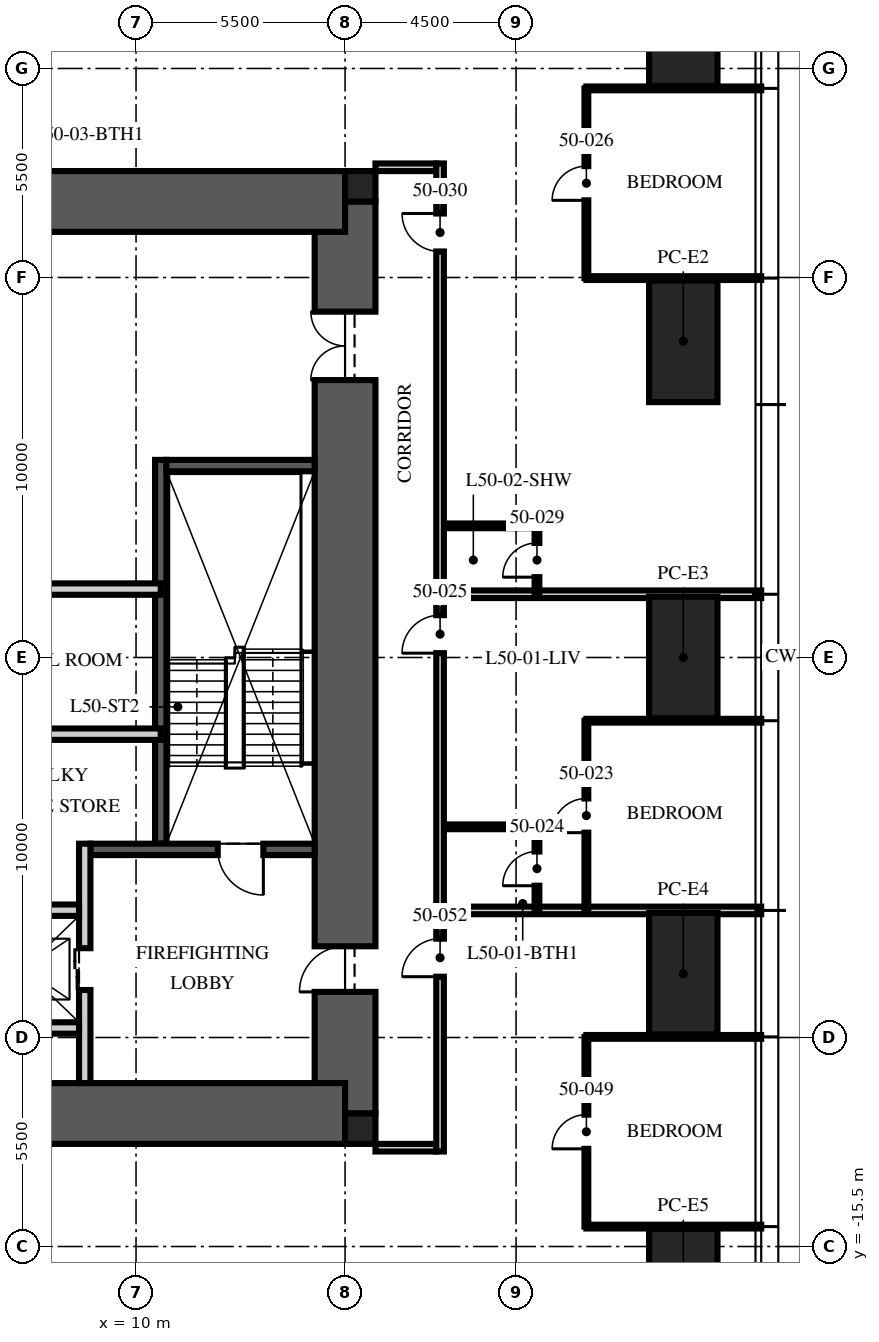
"""IFC4 building model, lengths in metres.
Left out: names, types, materials, properties, quantities, classifications, styles, units other than length and angle.
Written with IfcOpenShell. Run it as: python <this file> out.ifc"""

import sys

from ifc_helpers import new_model, si_unit, direction, frame, frame_2d, origin, origin_2d, place, context, subcontext, project, spatial, rectangle, hollow_rectangle, extrude, element, fill, save


model = new_model("IFC4")
c1 = context("Model", 3, precision=1e-05, world=origin(), true_north=direction((0.0, 1.0)))
c2 = subcontext(c1, "Body", "Model", "MODEL_VIEW")
j1 = project(units=[si_unit("LENGTHUNIT", "METRE"), si_unit("PLANEANGLEUNIT", "RADIAN")], contexts=[c1])
p1 = place(None, origin())
s1 = spatial("IfcSite", under=j1, at=p1, CompositionType="ELEMENT")
p2 = place(p1, origin())
s2 = spatial("IfcBuilding", under=s1, at=p2, CompositionType="ELEMENT")
p3 = place(p2, frame((0.0, 0.0, 203.25)))
s3 = spatial("IfcBuildingStorey", under=s2, at=p3, CompositionType="ELEMENT", Elevation=203.25)
p4 = place(p3, frame((15.5, -12.0, -0.25), z_axis=(0.0, 0.0, 1.0), x_axis=(0.0, 1.0, 0.0)))
e1 = element("IfcWall", 1, at=p4, inside=s3, PredefinedType="SHEAR", context=c2, shape_type="SweptSolid", body=[
    extrude(rectangle(XDim=24.0, YDim=1.6, at=frame_2d((12.0, 0.0))), origin(), (0.0, 0.0, 1.0), 3.75),
])
p5 = place(p4, frame((3.2, 0.0, 0.25)))
e2 = element("IfcOpeningElement", 2, at=p5, cuts=e1, PredefinedType="OPENING", context=c2, shape_type="SweptSolid", body=[
    extrude(rectangle(XDim=1.2, YDim=2.1, at=frame_2d((0.6, 1.05))), frame((0.0, 0.81, 0.0), z_axis=(0.0, -1.0, 0.0), x_axis=(1.0, 0.0, 0.0)), (0.0, 0.0, 1.0), 1.62),
])
p6 = place(p4, frame((19.3, 0.0, 0.25)))
e3 = element("IfcOpeningElement", 3, at=p6, cuts=e1, PredefinedType="OPENING", context=c2, shape_type="SweptSolid", body=[
    extrude(rectangle(XDim=1.8, YDim=2.1, at=frame_2d((0.9, 1.05))), frame((0.0, 0.81, 0.0), z_axis=(0.0, -1.0, 0.0), x_axis=(1.0, 0.0, 0.0)), (0.0, 0.0, 1.0), 1.62),
])
for number, where, z_axis, x_axis in (
    (4, (-15.5, 12.0, -0.25), (0.0, 0.0, 1.0), (1.0, 0.0, 0.0)),
    (5, (-15.5, -12.0, -0.25), (0.0, 0.0, 1.0), (1.0, 0.0, 0.0)),
):
    element("IfcWall", number, at=place(p3, frame(where, z_axis=z_axis, x_axis=x_axis)), inside=s3, PredefinedType="SHEAR", context=c2, shape_type="SweptSolid", body=[
        extrude(rectangle(XDim=31.0, YDim=1.6, at=frame_2d((15.5, 0.0))), origin(), (0.0, 0.0, 1.0), 3.75),
    ])
for number, where, z_axis, x_axis in (
    (6, (15.9, 12.4, -0.25), (0.0, 0.0, 1.0), (1.0, 0.0, 0.0)),
    (7, (15.9, -12.4, -0.25), (0.0, 0.0, 1.0), (1.0, 0.0, 0.0)),
):
    element("IfcColumn", number, at=place(p3, frame(where, z_axis=z_axis, x_axis=x_axis)), inside=s3, PredefinedType="COLUMN", context=c2, shape_type="SweptSolid", body=[
        extrude(rectangle(XDim=0.8, YDim=0.8, at=origin_2d()), origin(), (0.0, 0.0, 1.0), 3.75),
    ])
for number, where, z_axis, x_axis in (
    (8, (24.4, 16.64, 0.0), (0.0, 0.0, 1.0), (0.0, 1.0, 0.0)),
    (9, (24.4, 8.32, 0.0), (0.0, 0.0, 1.0), (0.0, 1.0, 0.0)),
    (10, (24.4, 0.0, 0.0), (0.0, 0.0, 1.0), (0.0, 1.0, 0.0)),
    (11, (24.4, -8.32, 0.0), (0.0, 0.0, 1.0), (0.0, 1.0, 0.0)),
    (12, (24.4, -16.64, 0.0), (0.0, 0.0, 1.0), (0.0, 1.0, 0.0)),
):
    element("IfcColumn", number, at=place(p3, frame(where, z_axis=z_axis, x_axis=x_axis)), inside=s3, PredefinedType="COLUMN", context=c2, shape_type="SweptSolid", body=[
        extrude(hollow_rectangle(XDim=3.2, YDim=1.8, WallThickness=0.2, at=origin_2d()), origin(), (0.0, 0.0, 1.0), 3.75),
    ])
p7 = place(p3, frame((10.65, -4.9, 0.0), z_axis=(0.0, 0.0, 1.0), x_axis=(0.0, 1.0, 0.0)))
e13 = element("IfcWall", 13, at=p7, inside=s3, PredefinedType="SOLIDWALL", context=c2, shape_type="SweptSolid", body=[
    extrude(rectangle(XDim=10.1, YDim=0.3, at=frame_2d((5.05, 0.0))), origin(), (0.0, 0.0, 1.0), 3.5),
])
p8 = place(p3, frame((14.7, -5.05, 0.0), z_axis=(0.0, 0.0, 1.0), x_axis=(-1.0, 0.0, 0.0)))
e14 = element("IfcWall", 14, at=p8, inside=s3, PredefinedType="SOLIDWALL", context=c2, shape_type="SweptSolid", body=[
    extrude(rectangle(XDim=5.9, YDim=0.3, at=frame_2d((2.95, 0.0))), origin(), (0.0, 0.0, 1.0), 3.5),
])
p9 = place(p8, frame((1.35, 0.0, 0.0)))
e15 = element("IfcOpeningElement", 15, at=p9, cuts=e14, PredefinedType="OPENING", context=c2, shape_type="SweptSolid", body=[
    extrude(rectangle(XDim=1.2, YDim=2.1, at=frame_2d((0.6, 1.05))), frame((0.0, 0.16, 0.0), z_axis=(0.0, -1.0, 0.0), x_axis=(1.0, 0.0, 0.0)), (0.0, 0.0, 1.0), 0.32),
])
p10 = place(p3, frame((14.7, 5.05, 0.0), z_axis=(0.0, 0.0, 1.0), x_axis=(-1.0, 0.0, 0.0)))
e16 = element("IfcWall", 16, at=p10, inside=s3, PredefinedType="SOLIDWALL", context=c2, shape_type="SweptSolid", body=[
    extrude(rectangle(XDim=3.9, YDim=0.3, at=frame_2d((1.95, 0.0))), origin(), (0.0, 0.0, 1.0), 3.5),
])
p11 = place(p3, frame((8.65, -11.2, 0.0), z_axis=(0.0, 0.0, 1.0), x_axis=(0.0, 1.0, 0.0)))
e17 = element("IfcWall", 17, at=p11, inside=s3, PredefinedType="PARTITIONING", context=c2, shape_type="SweptSolid", body=[
    extrude(rectangle(XDim=6.3, YDim=0.3, at=frame_2d((3.15, 0.0))), origin(), (0.0, 0.0, 1.0), 3.5),
])
p12 = place(p11, frame((2.45, 0.0, 0.0)))
e18 = element("IfcOpeningElement", 18, at=p12, cuts=e17, PredefinedType="OPENING", context=c2, shape_type="SweptSolid", body=[
    extrude(rectangle(XDim=1.1, YDim=2.1, at=frame_2d((0.55, 1.05))), frame((0.0, 0.16, 0.0), z_axis=(0.0, -1.0, 0.0), x_axis=(1.0, 0.0, 0.0)), (0.0, 0.0, 1.0), 0.32),
])
p13 = place(p3, frame((-8.5, -6.65, 0.0), z_axis=(0.0, 0.0, 1.0), x_axis=(1.0, 0.0, 0.0)))
e19 = element("IfcWall", 19, at=p13, inside=s3, PredefinedType="PARTITIONING", context=c2, shape_type="SweptSolid", body=[
    extrude(rectangle(XDim=17.0, YDim=0.3, at=frame_2d((8.5, 0.0))), origin(), (0.0, 0.0, 1.0), 3.5),
])
p14 = place(p13, frame((7.8, 0.0, 0.0)))
e20 = element("IfcOpeningElement", 20, at=p14, cuts=e19, PredefinedType="OPENING", context=c2, shape_type="SweptSolid", body=[
    extrude(rectangle(XDim=1.3, YDim=2.4, at=frame_2d((0.65, 1.2))), frame((0.0, 0.16, 0.0), z_axis=(0.0, -1.0, 0.0), x_axis=(1.0, 0.0, 0.0)), (0.0, 0.0, 1.0), 0.32),
])
p15 = place(p13, frame((5.65, 0.0, 0.0)))
e21 = element("IfcOpeningElement", 21, at=p15, cuts=e19, PredefinedType="OPENING", context=c2, shape_type="SweptSolid", body=[
    extrude(rectangle(XDim=0.9, YDim=2.1, at=frame_2d((0.45, 1.05))), frame((0.0, 0.16, 0.0), z_axis=(0.0, -1.0, 0.0), x_axis=(1.0, 0.0, 0.0)), (0.0, 0.0, 1.0), 0.32),
])
p16 = place(p13, frame((10.4, 0.0, 0.0)))
e22 = element("IfcOpeningElement", 22, at=p16, cuts=e19, PredefinedType="OPENING", context=c2, shape_type="SweptSolid", body=[
    extrude(rectangle(XDim=0.9, YDim=2.1, at=frame_2d((0.45, 1.05))), frame((0.0, 0.16, 0.0), z_axis=(0.0, -1.0, 0.0), x_axis=(1.0, 0.0, 0.0)), (0.0, 0.0, 1.0), 0.32),
])
p17 = place(p3, frame((5.6, -9.75, 0.0), z_axis=(0.0, 0.0, 1.0), x_axis=(1.0, 0.0, 0.0)))
e23 = element("IfcWall", 23, at=p17, inside=s3, PredefinedType="PARTITIONING", context=c2, shape_type="SweptSolid", body=[
    extrude(rectangle(XDim=2.9, YDim=0.3, at=frame_2d((1.45, 0.0))), origin(), (0.0, 0.0, 1.0), 3.5),
])
p18 = place(p3, frame((-10.65, 1.8, 0.0), z_axis=(0.0, 0.0, 1.0), x_axis=(1.0, 0.0, 0.0)))
e24 = element("IfcWall", 24, at=p18, inside=s3, PredefinedType="PARTITIONING", context=c2, shape_type="SweptSolid", body=[
    extrude(rectangle(XDim=21.3, YDim=0.3, at=frame_2d((10.65, 0.0))), origin(), (0.0, 0.0, 1.0), 3.5),
])
p19 = place(p18, frame((10.05, 0.0, 0.0)))
e25 = element("IfcOpeningElement", 25, at=p19, cuts=e24, PredefinedType="OPENING", context=c2, shape_type="SweptSolid", body=[
    extrude(rectangle(XDim=1.2, YDim=2.1, at=frame_2d((0.6, 1.05))), frame((0.0, 0.16, 0.0), z_axis=(0.0, -1.0, 0.0), x_axis=(1.0, 0.0, 0.0)), (0.0, 0.0, 1.0), 0.32),
])
p20 = place(p18, frame((0.938, 0.0, 0.0)))
e26 = element("IfcOpeningElement", 26, at=p20, cuts=e24, PredefinedType="OPENING", context=c2, shape_type="SweptSolid", body=[
    extrude(rectangle(XDim=0.9, YDim=2.1, at=frame_2d((0.45, 1.05))), frame((0.0, 0.16, 0.0), z_axis=(0.0, -1.0, 0.0), x_axis=(1.0, 0.0, 0.0)), (0.0, 0.0, 1.0), 0.32),
])
p21 = place(p3, frame((10.65, -2.018, 0.0), z_axis=(0.0, 0.0, 1.0), x_axis=(-1.0, 0.0, 0.0)))
e27 = element("IfcWall", 27, at=p21, inside=s3, PredefinedType="PARTITIONING", context=c2, shape_type="SweptSolid", body=[
    extrude(rectangle(XDim=5.55, YDim=0.3, at=frame_2d((2.775, 0.0))), origin(), (0.0, 0.0, 1.0), 3.5),
])
for number, where, z_axis, x_axis in (
    (28, (16.3, 12.9, 0.0), (0.0, 0.0, 1.0), (1.0, 0.0, 0.0)),
    (29, (16.3, -12.9, 0.0), (0.0, 0.0, 1.0), (1.0, 0.0, 0.0)),
):
    element("IfcWall", number, at=place(p3, frame(where, z_axis=z_axis, x_axis=x_axis)), inside=s3, PredefinedType="PARTITIONING", context=c2, shape_type="SweptSolid", body=[
        extrude(rectangle(XDim=1.6, YDim=0.2, at=frame_2d((0.8, 0.0))), origin(), (0.0, 0.0, 1.0), 2.3),
    ])
p22 = place(p3, frame((18.1, -6.656, 0.0), z_axis=(0.0, 0.0, 1.0), x_axis=(1.0, 0.0, 0.0)))
e30 = element("IfcWall", 30, at=p22, inside=s3, PredefinedType="PARTITIONING", context=c2, shape_type="SweptSolid", body=[
    extrude(rectangle(XDim=8.35, YDim=0.2, at=frame_2d((4.175, 0.0))), origin(), (0.0, 0.0, 1.0), 2.91),
])
p23 = place(p3, frame((21.85, -1.664, 0.0), z_axis=(0.0, 0.0, 1.0), x_axis=(1.0, 0.0, 0.0)))
e31 = element("IfcWall", 31, at=p23, inside=s3, PredefinedType="PARTITIONING", context=c2, shape_type="SweptSolid", body=[
    extrude(rectangle(XDim=4.6, YDim=0.1, at=frame_2d((2.3, 0.0))), origin(), (0.0, 0.0, 1.0), 2.91),
])
p24 = place(p3, frame((18.1, 1.664, 0.0), z_axis=(0.0, 0.0, 1.0), x_axis=(1.0, 0.0, 0.0)))
e32 = element("IfcWall", 32, at=p24, inside=s3, PredefinedType="PARTITIONING", context=c2, shape_type="SweptSolid", body=[
    extrude(rectangle(XDim=8.35, YDim=0.2, at=frame_2d((4.175, 0.0))), origin(), (0.0, 0.0, 1.0), 2.91),
])
for number, where, z_axis, x_axis in (
    (33, (21.85, 9.984, 0.0), (0.0, 0.0, 1.0), (1.0, 0.0, 0.0)),
    (34, (21.85, 14.976, 0.0), (0.0, 0.0, 1.0), (1.0, 0.0, 0.0)),
    (35, (21.85, -14.976, 0.0), (0.0, 0.0, 1.0), (1.0, 0.0, 0.0)),
    (36, (21.85, -9.984, 0.0), (0.0, 0.0, 1.0), (1.0, 0.0, 0.0)),
):
    element("IfcWall", number, at=place(p3, frame(where, z_axis=z_axis, x_axis=x_axis)), inside=s3, PredefinedType="PARTITIONING", context=c2, shape_type="SweptSolid", body=[
        extrude(rectangle(XDim=4.6, YDim=0.1, at=frame_2d((2.3, 0.0))), origin(), (0.0, 0.0, 1.0), 2.91),
    ])
p25 = place(p3, frame((21.85, -6.656, 0.0), z_axis=(0.0, 0.0, 1.0), x_axis=(0.0, 1.0, 0.0)))
e37 = element("IfcWall", 37, at=p25, inside=s3, PredefinedType="PARTITIONING", context=c2, shape_type="SweptSolid", body=[
    extrude(rectangle(XDim=4.992, YDim=0.1, at=frame_2d((2.496, 0.0))), origin(), (0.0, 0.0, 1.0), 2.81),
])
p26 = place(p25, frame((2.046, 0.0, 0.0)))
e38 = element("IfcOpeningElement", 38, at=p26, cuts=e37, PredefinedType="OPENING", context=c2, shape_type="SweptSolid", body=[
    extrude(rectangle(XDim=0.9, YDim=2.1, at=frame_2d((0.45, 1.05))), frame((0.0, 0.06, 0.0), z_axis=(0.0, -1.0, 0.0), x_axis=(1.0, 0.0, 0.0)), (0.0, 0.0, 1.0), 0.12),
])
p27 = place(p3, frame((20.55, -6.656, 0.0), z_axis=(0.0, 0.0, 1.0), x_axis=(0.0, 1.0, 0.0)))
e39 = element("IfcWall", 39, at=p27, inside=s3, PredefinedType="PARTITIONING", context=c2, shape_type="SweptSolid", body=[
    extrude(rectangle(XDim=2.2, YDim=0.125, at=frame_2d((1.1, 0.0))), origin(), (0.0, 0.0, 1.0), 3.5),
])
p28 = place(p27, frame((0.65, 0.0, 0.0)))
e40 = element("IfcOpeningElement", 40, at=p28, cuts=e39, PredefinedType="OPENING", context=c2, shape_type="SweptSolid", body=[
    extrude(rectangle(XDim=0.9, YDim=2.1, at=frame_2d((0.45, 1.05))), frame((0.0, 0.073, 0.0), z_axis=(0.0, -1.0, 0.0), x_axis=(1.0, 0.0, 0.0)), (0.0, 0.0, 1.0), 0.145),
])
p29 = place(p3, frame((18.1, -4.456, 0.0), z_axis=(0.0, 0.0, 1.0), x_axis=(1.0, 0.0, 0.0)))
e41 = element("IfcWall", 41, at=p29, inside=s3, PredefinedType="PARTITIONING", context=c2, shape_type="SweptSolid", body=[
    extrude(rectangle(XDim=2.45, YDim=0.125, at=frame_2d((1.225, 0.0))), origin(), (0.0, 0.0, 1.0), 3.5),
])
p30 = place(p3, frame((21.85, 9.984, 0.0), z_axis=(0.0, 0.0, 1.0), x_axis=(0.0, 1.0, 0.0)))
e42 = element("IfcWall", 42, at=p30, inside=s3, PredefinedType="PARTITIONING", context=c2, shape_type="SweptSolid", body=[
    extrude(rectangle(XDim=4.992, YDim=0.1, at=frame_2d((2.496, 0.0))), origin(), (0.0, 0.0, 1.0), 2.81),
])
p31 = place(p30, frame((2.046, 0.0, 0.0)))
e43 = element("IfcOpeningElement", 43, at=p31, cuts=e42, PredefinedType="OPENING", context=c2, shape_type="SweptSolid", body=[
    extrude(rectangle(XDim=0.9, YDim=2.1, at=frame_2d((0.45, 1.05))), frame((0.0, 0.06, 0.0), z_axis=(0.0, -1.0, 0.0), x_axis=(1.0, 0.0, 0.0)), (0.0, 0.0, 1.0), 0.12),
])
p32 = place(p3, frame((20.55, 1.664, 0.0), z_axis=(0.0, 0.0, 1.0), x_axis=(0.0, 1.0, 0.0)))
e44 = element("IfcWall", 44, at=p32, inside=s3, PredefinedType="PARTITIONING", context=c2, shape_type="SweptSolid", body=[
    extrude(rectangle(XDim=1.8, YDim=0.125, at=frame_2d((0.9, 0.0))), origin(), (0.0, 0.0, 1.0), 3.5),
])
p33 = place(p32, frame((0.45, 0.0, 0.0)))
e45 = element("IfcOpeningElement", 45, at=p33, cuts=e44, PredefinedType="OPENING", context=c2, shape_type="SweptSolid", body=[
    extrude(rectangle(XDim=0.9, YDim=2.1, at=frame_2d((0.45, 1.05))), frame((0.0, 0.073, 0.0), z_axis=(0.0, -1.0, 0.0), x_axis=(1.0, 0.0, 0.0)), (0.0, 0.0, 1.0), 0.145),
])
p34 = place(p3, frame((18.1, 3.464, 0.0), z_axis=(0.0, 0.0, 1.0), x_axis=(1.0, 0.0, 0.0)))
e46 = element("IfcWall", 46, at=p34, inside=s3, PredefinedType="PARTITIONING", context=c2, shape_type="SweptSolid", body=[
    extrude(rectangle(XDim=2.45, YDim=0.125, at=frame_2d((1.225, 0.0))), origin(), (0.0, 0.0, 1.0), 3.5),
])
p35 = place(p3, frame((21.85, -14.976, 0.0), z_axis=(0.0, 0.0, 1.0), x_axis=(0.0, 1.0, 0.0)))
e47 = element("IfcWall", 47, at=p35, inside=s3, PredefinedType="PARTITIONING", context=c2, shape_type="SweptSolid", body=[
    extrude(rectangle(XDim=4.992, YDim=0.1, at=frame_2d((2.496, 0.0))), origin(), (0.0, 0.0, 1.0), 2.81),
])
p36 = place(p35, frame((2.046, 0.0, 0.0)))
e48 = element("IfcOpeningElement", 48, at=p36, cuts=e47, PredefinedType="OPENING", context=c2, shape_type="SweptSolid", body=[
    extrude(rectangle(XDim=0.9, YDim=2.1, at=frame_2d((0.45, 1.05))), frame((0.0, 0.06, 0.0), z_axis=(0.0, -1.0, 0.0), x_axis=(1.0, 0.0, 0.0)), (0.0, 0.0, 1.0), 0.12),
])
p37 = place(p3, frame((18.0, -13.0, 0.0), z_axis=(0.0, 0.0, 1.0), x_axis=(0.0, 1.0, 0.0)))
e49 = element("IfcWall", 49, at=p37, inside=s3, PredefinedType="PARTITIONING", context=c2, shape_type="SweptSolid", body=[
    extrude(rectangle(XDim=26.0, YDim=0.2, at=frame_2d((13.0, 0.0))), origin(), (0.0, 0.0, 1.0), 2.6),
])
p38 = place(p37, frame((13.114, 0.0, 0.0)))
e50 = element("IfcOpeningElement", 50, at=p38, cuts=e49, PredefinedType="OPENING", context=c2, shape_type="SweptSolid", body=[
    extrude(rectangle(XDim=1.0, YDim=2.2, at=frame_2d((0.5, 1.1))), frame((0.0, 0.11, 0.0), z_axis=(0.0, -1.0, 0.0), x_axis=(1.0, 0.0, 0.0)), (0.0, 0.0, 1.0), 0.22),
])
p39 = place(p37, frame((23.684, 0.0, 0.0)))
e51 = element("IfcOpeningElement", 51, at=p39, cuts=e49, PredefinedType="OPENING", context=c2, shape_type="SweptSolid", body=[
    extrude(rectangle(XDim=1.0, YDim=2.2, at=frame_2d((0.5, 1.1))), frame((0.0, 0.11, 0.0), z_axis=(0.0, -1.0, 0.0), x_axis=(1.0, 0.0, 0.0)), (0.0, 0.0, 1.0), 0.22),
])
p40 = place(p37, frame((4.6, 0.0, 0.0)))
e52 = element("IfcOpeningElement", 52, at=p40, cuts=e49, PredefinedType="OPENING", context=c2, shape_type="SweptSolid", body=[
    extrude(rectangle(XDim=1.0, YDim=2.2, at=frame_2d((0.5, 1.1))), frame((0.0, 0.11, 0.0), z_axis=(0.0, -1.0, 0.0), x_axis=(1.0, 0.0, 0.0)), (0.0, 0.0, 1.0), 0.22),
])
p41 = place(p9, origin())
e53 = element("IfcDoor", 53, at=p41, inside=s3, OperationType="SINGLE_SWING_LEFT", PredefinedType="DOOR", context=c2, shape_type="SweptSolid", body=[
    extrude(rectangle(XDim=1.2, YDim=2.1, at=frame_2d((0.6, 1.05))), frame((0.0, 0.025, 0.0), z_axis=(0.0, -1.0, 0.0), x_axis=(1.0, 0.0, 0.0)), (0.0, 0.0, 1.0), 0.05),
])
fill(e15, e53)
p42 = place(p5, origin())
e54 = element("IfcDoor", 54, at=p42, inside=s3, OperationType="SINGLE_SWING_LEFT", PredefinedType="DOOR", context=c2, shape_type="SweptSolid", body=[
    extrude(rectangle(XDim=1.2, YDim=2.1, at=frame_2d((0.6, 1.05))), frame((0.0, 0.025, 0.0), z_axis=(0.0, -1.0, 0.0), x_axis=(1.0, 0.0, 0.0)), (0.0, 0.0, 1.0), 0.05),
])
fill(e2, e54)
p43 = place(p6, origin())
e55 = element("IfcDoor", 55, at=p43, inside=s3, OperationType="DOUBLE_DOOR_SINGLE_SWING", PredefinedType="DOOR", context=c2, shape_type="SweptSolid", body=[
    extrude(rectangle(XDim=1.8, YDim=2.1, at=frame_2d((0.9, 1.05))), frame((0.0, 0.025, 0.0), z_axis=(0.0, -1.0, 0.0), x_axis=(1.0, 0.0, 0.0)), (0.0, 0.0, 1.0), 0.05),
])
fill(e3, e55)
p44 = place(p12, origin())
e56 = element("IfcDoor", 56, at=p44, inside=s3, OperationType="DOUBLE_DOOR_SLIDING", PredefinedType="DOOR", context=c2, shape_type="SweptSolid", body=[
    extrude(rectangle(XDim=1.1, YDim=2.1, at=frame_2d((0.55, 1.05))), frame((0.0, 0.025, 0.0), z_axis=(0.0, -1.0, 0.0), x_axis=(1.0, 0.0, 0.0)), (0.0, 0.0, 1.0), 0.05),
])
fill(e18, e56)
p45 = place(p26, origin())
e57 = element("IfcDoor", 57, at=p45, inside=s3, OperationType="SINGLE_SWING_LEFT", PredefinedType="DOOR", context=c2, shape_type="SweptSolid", body=[
    extrude(rectangle(XDim=0.9, YDim=2.1, at=frame_2d((0.45, 1.05))), frame((0.0, 0.025, 0.0), z_axis=(0.0, -1.0, 0.0), x_axis=(1.0, 0.0, 0.0)), (0.0, 0.0, 1.0), 0.05),
])
fill(e38, e57)
p46 = place(p28, origin())
e58 = element("IfcDoor", 58, at=p46, inside=s3, OperationType="SINGLE_SWING_LEFT", PredefinedType="DOOR", context=c2, shape_type="SweptSolid", body=[
    extrude(rectangle(XDim=0.9, YDim=2.1, at=frame_2d((0.45, 1.05))), frame((0.0, 0.025, 0.0), z_axis=(0.0, -1.0, 0.0), x_axis=(1.0, 0.0, 0.0)), (0.0, 0.0, 1.0), 0.05),
])
fill(e40, e58)
p47 = place(p38, origin())
e59 = element("IfcDoor", 59, at=p47, inside=s3, OperationType="SINGLE_SWING_LEFT", PredefinedType="DOOR", context=c2, shape_type="SweptSolid", body=[
    extrude(rectangle(XDim=1.0, YDim=2.2, at=frame_2d((0.5, 1.1))), frame((0.0, 0.025, 0.0), z_axis=(0.0, -1.0, 0.0), x_axis=(1.0, 0.0, 0.0)), (0.0, 0.0, 1.0), 0.05),
])
fill(e50, e59)
p48 = place(p31, origin())
e60 = element("IfcDoor", 60, at=p48, inside=s3, OperationType="SINGLE_SWING_LEFT", PredefinedType="DOOR", context=c2, shape_type="SweptSolid", body=[
    extrude(rectangle(XDim=0.9, YDim=2.1, at=frame_2d((0.45, 1.05))), frame((0.0, 0.025, 0.0), z_axis=(0.0, -1.0, 0.0), x_axis=(1.0, 0.0, 0.0)), (0.0, 0.0, 1.0), 0.05),
])
fill(e43, e60)
p49 = place(p33, origin())
e61 = element("IfcDoor", 61, at=p49, inside=s3, OperationType="SINGLE_SWING_LEFT", PredefinedType="DOOR", context=c2, shape_type="SweptSolid", body=[
    extrude(rectangle(XDim=0.9, YDim=2.1, at=frame_2d((0.45, 1.05))), frame((0.0, 0.025, 0.0), z_axis=(0.0, -1.0, 0.0), x_axis=(1.0, 0.0, 0.0)), (0.0, 0.0, 1.0), 0.05),
])
fill(e45, e61)
p50 = place(p39, origin())
e62 = element("IfcDoor", 62, at=p50, inside=s3, OperationType="SINGLE_SWING_RIGHT", PredefinedType="DOOR", context=c2, shape_type="SweptSolid", body=[
    extrude(rectangle(XDim=1.0, YDim=2.2, at=frame_2d((0.5, 1.1))), frame((0.0, 0.025, 0.0), z_axis=(0.0, -1.0, 0.0), x_axis=(1.0, 0.0, 0.0)), (0.0, 0.0, 1.0), 0.05),
])
fill(e51, e62)
p51 = place(p36, origin())
e63 = element("IfcDoor", 63, at=p51, inside=s3, OperationType="SINGLE_SWING_LEFT", PredefinedType="DOOR", context=c2, shape_type="SweptSolid", body=[
    extrude(rectangle(XDim=0.9, YDim=2.1, at=frame_2d((0.45, 1.05))), frame((0.0, 0.025, 0.0), z_axis=(0.0, -1.0, 0.0), x_axis=(1.0, 0.0, 0.0)), (0.0, 0.0, 1.0), 0.05),
])
fill(e48, e63)
p52 = place(p40, origin())
e64 = element("IfcDoor", 64, at=p52, inside=s3, OperationType="SINGLE_SWING_LEFT", PredefinedType="DOOR", context=c2, shape_type="SweptSolid", body=[
    extrude(rectangle(XDim=1.0, YDim=2.2, at=frame_2d((0.5, 1.1))), frame((0.0, 0.025, 0.0), z_axis=(0.0, -1.0, 0.0), x_axis=(1.0, 0.0, 0.0)), (0.0, 0.0, 1.0), 0.05),
])
fill(e52, e64)
save(model, sys.argv[1])
